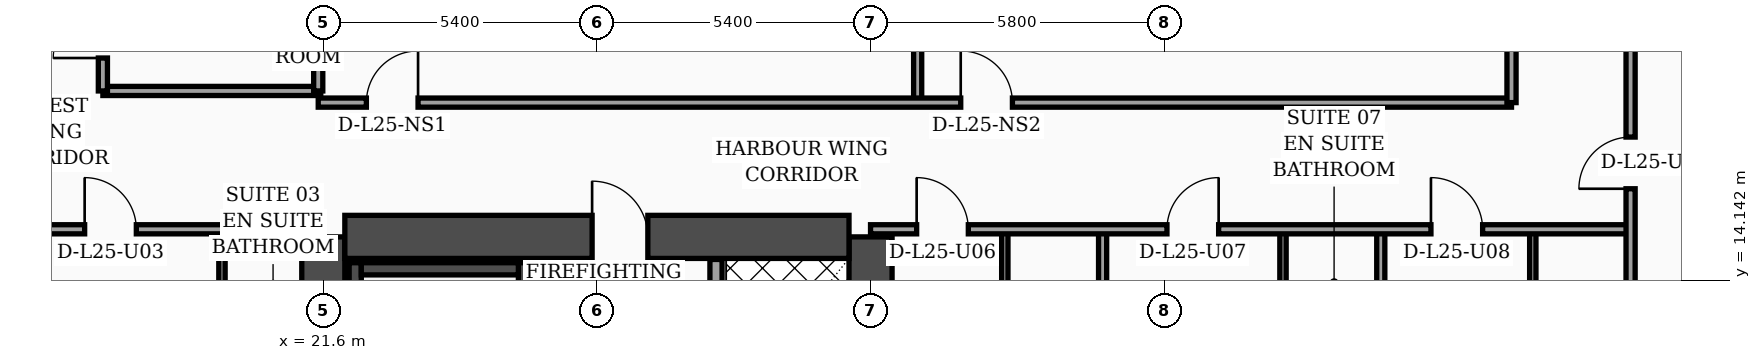
"""IFC4 building model, lengths in metres.
Left out: names, types, materials, properties, quantities, classifications, styles, units other than length and angle.
Written with IfcOpenShell. Run it as: python <this file> out.ifc"""

import sys

from ifc_helpers import new_model, si_unit, direction, frame, frame_2d, origin, place, context, subcontext, project, spatial, rectangle, extrude, element, fill, save


model = new_model("IFC4")
c1 = context("Model", 3, precision=1e-05, world=origin(), true_north=direction((0.0, 1.0)))
c2 = subcontext(c1, "Body", "Model", "MODEL_VIEW")
j1 = project(units=[si_unit("LENGTHUNIT", "METRE"), si_unit("PLANEANGLEUNIT", "RADIAN")], contexts=[c1])
p1 = place(None, origin())
s1 = spatial("IfcSite", under=j1, at=p1, CompositionType="ELEMENT")
p2 = place(p1, origin())
s2 = spatial("IfcBuilding", under=s1, at=p2, CompositionType="ELEMENT")
p3 = place(p2, frame((0.0, 0.0, 105.0)))
s3 = spatial("IfcBuildingStorey", under=s2, at=p3, CompositionType="ELEMENT", Elevation=105.0)
for number, where, z_axis, x_axis in (
    (1, (21.6, 4.6, 0.0), (0.0, 0.0, 1.0), (0.0, 1.0, 0.0)),
    (2, (32.4, 4.6, 0.0), (0.0, 0.0, 1.0), (0.0, 1.0, 0.0)),
):
    element("IfcWall", number, at=place(p3, frame(where, z_axis=z_axis, x_axis=x_axis)), inside=s3, PredefinedType="SHEAR", context=c2, shape_type="SweptSolid", body=[
        extrude(rectangle(XDim=10.4, YDim=0.85, at=frame_2d((5.2, 0.0))), origin(), (0.0, 0.0, 1.0), 3.56),
    ])
p4 = place(p3, frame((22.025, 15.0, 0.0), z_axis=(0.0, 0.0, 1.0), x_axis=(1.0, 0.0, 0.0)))
e3 = element("IfcWall", 3, at=p4, inside=s3, PredefinedType="SHEAR", context=c2, shape_type="SweptSolid", body=[
    extrude(rectangle(XDim=9.95, YDim=0.85, at=frame_2d((4.975, 0.0))), origin(), (0.0, 0.0, 1.0), 3.56),
])
p5 = place(p4, frame((4.88, 0.0, 0.0)))
e4 = element("IfcOpeningElement", 4, at=p5, cuts=e3, PredefinedType="OPENING", context=c2, shape_type="SweptSolid", body=[
    extrude(rectangle(XDim=1.1, YDim=2.2, at=frame_2d((0.55, 1.1))), frame((0.0, 0.435, 0.0), z_axis=(0.0, -1.0, 0.0), x_axis=(1.0, 0.0, 0.0)), (0.0, 0.0, 1.0), 0.87),
])
p6 = place(p3, frame((22.23, 5.025, 0.0), z_axis=(0.0, 0.0, 1.0), x_axis=(0.0, 1.0, 0.0)))
e5 = element("IfcWall", 5, at=p6, inside=s3, PredefinedType="SOLIDWALL", context=c2, shape_type="SweptSolid", body=[
    extrude(rectangle(XDim=9.465, YDim=0.24, at=frame_2d((4.732, 0.0))), origin(), (0.0, 0.0, 1.0), 3.56),
])
p7 = place(p3, frame((25.57, 5.025, 0.0), z_axis=(0.0, 0.0, 1.0), x_axis=(0.0, 1.0, 0.0)))
e6 = element("IfcWall", 6, at=p7, inside=s3, PredefinedType="SOLIDWALL", context=c2, shape_type="SweptSolid", body=[
    extrude(rectangle(XDim=9.465, YDim=0.24, at=frame_2d((4.732, 0.0))), origin(), (0.0, 0.0, 1.0), 3.56),
])
p8 = place(p7, frame((0.35, 0.0, 0.0)))
e7 = element("IfcOpeningElement", 7, at=p8, cuts=e6, PredefinedType="OPENING", context=c2, shape_type="SweptSolid", body=[
    extrude(rectangle(XDim=1.15, YDim=2.2, at=frame_2d((0.575, 1.1))), frame((0.0, 0.13, 0.0), z_axis=(0.0, -1.0, 0.0), x_axis=(1.0, 0.0, 0.0)), (0.0, 0.0, 1.0), 0.26),
])
p9 = place(p3, frame((22.35, 14.37, 0.0), z_axis=(0.0, 0.0, 1.0), x_axis=(1.0, 0.0, 0.0)))
e8 = element("IfcWall", 8, at=p9, inside=s3, PredefinedType="SOLIDWALL", context=c2, shape_type="SweptSolid", body=[
    extrude(rectangle(XDim=3.1, YDim=0.24, at=frame_2d((1.55, 0.0))), origin(), (0.0, 0.0, 1.0), 3.56),
])
p10 = place(p3, frame((29.35, 5.045, 0.0), z_axis=(0.0, 0.0, 1.0), x_axis=(0.0, 1.0, 0.0)))
e9 = element("IfcWall", 9, at=p10, inside=s3, PredefinedType="SOLIDWALL", context=c2, shape_type="SweptSolid", body=[
    extrude(rectangle(XDim=9.51, YDim=0.24, at=frame_2d((4.755, 0.0))), origin(), (0.0, 0.0, 1.0), 3.56),
])
p11 = place(p10, frame((0.55, 0.0, 0.0)))
e10 = element("IfcOpeningElement", 10, at=p11, cuts=e9, PredefinedType="OPENING", context=c2, shape_type="SweptSolid", body=[
    extrude(rectangle(XDim=1.3, YDim=2.35, at=frame_2d((0.65, 1.175))), frame((0.0, 0.13, 0.0), z_axis=(0.0, -1.0, 0.0), x_axis=(1.0, 0.0, 0.0)), (0.0, 0.0, 1.0), 0.26),
])
p12 = place(p3, frame((19.6, 2.44, 0.0), z_axis=(0.0, 0.0, 1.0), x_axis=(0.0, 1.0, 0.0)))
e11 = element("IfcWall", 11, at=p12, inside=s3, PredefinedType="PARTITIONING", context=c2, shape_type="SweptSolid", body=[
    extrude(rectangle(XDim=12.71, YDim=0.125, at=frame_2d((6.355, 0.0))), origin(), (0.0, 0.0, 1.0), 2.49),
])
p13 = place(p12, frame((4.34, 0.0, 0.0)))
e12 = element("IfcOpeningElement", 12, at=p13, cuts=e11, PredefinedType="OPENING", context=c2, shape_type="SweptSolid", body=[
    extrude(rectangle(XDim=0.96, YDim=2.2, at=frame_2d((0.48, 1.1))), frame((0.0, 0.073, 0.0), z_axis=(0.0, -1.0, 0.0), x_axis=(1.0, 0.0, 0.0)), (0.0, 0.0, 1.0), 0.145),
])
p14 = place(p12, frame((10.18, 0.0, 0.0)))
e13 = element("IfcOpeningElement", 13, at=p14, cuts=e11, PredefinedType="OPENING", context=c2, shape_type="SweptSolid", body=[
    extrude(rectangle(XDim=0.9, YDim=2.15, at=frame_2d((0.45, 1.075))), frame((0.0, 0.073, 0.0), z_axis=(0.0, -1.0, 0.0), x_axis=(1.0, 0.0, 0.0)), (0.0, 0.0, 1.0), 0.145),
])
p15 = place(p3, frame((15.15, 15.15, 0.0), z_axis=(0.0, 0.0, 1.0), x_axis=(1.0, 0.0, 0.0)))
e14 = element("IfcWall", 14, at=p15, inside=s3, PredefinedType="PARTITIONING", context=c2, shape_type="SweptSolid", body=[
    extrude(rectangle(XDim=6.45, YDim=0.18, at=frame_2d((3.225, 0.0))), origin(), (0.0, 0.0, 1.0), 2.49),
])
p16 = place(p15, frame((1.74, 0.0, 0.0)))
e15 = element("IfcOpeningElement", 15, at=p16, cuts=e14, PredefinedType="OPENING", context=c2, shape_type="SweptSolid", body=[
    extrude(rectangle(XDim=1.02, YDim=2.2, at=frame_2d((0.51, 1.1))), frame((0.0, 0.1, 0.0), z_axis=(0.0, -1.0, 0.0), x_axis=(1.0, 0.0, 0.0)), (0.0, 0.0, 1.0), 0.2),
])
p17 = place(p3, frame((17.25, 17.88, 0.0), z_axis=(0.0, 0.0, 1.0), x_axis=(1.0, 0.0, 0.0)))
e16 = element("IfcWall", 16, at=p17, inside=s3, PredefinedType="PARTITIONING", context=c2, shape_type="SweptSolid", body=[
    extrude(rectangle(XDim=4.3, YDim=0.18, at=frame_2d((2.15, 0.0))), origin(), (0.0, 0.0, 1.0), 3.09),
])
p18 = place(p3, frame((21.5, 17.88, 0.0), z_axis=(0.0, 0.0, 1.0), x_axis=(0.0, 1.0, 0.0)))
e17 = element("IfcWall", 17, at=p18, inside=s3, PredefinedType="PARTITIONING", context=c2, shape_type="SweptSolid", body=[
    extrude(rectangle(XDim=6.44, YDim=0.18, at=frame_2d((3.22, 0.0))), origin(), (0.0, 0.0, 1.0), 3.09),
])
p19 = place(p3, frame((17.25, 17.88, 0.0), z_axis=(0.0, 0.0, 1.0), x_axis=(0.0, 1.0, 0.0)))
e18 = element("IfcWall", 18, at=p19, inside=s3, PredefinedType="PARTITIONING", context=c2, shape_type="SweptSolid", body=[
    extrude(rectangle(XDim=6.44, YDim=0.18, at=frame_2d((3.22, 0.0))), origin(), (0.0, 0.0, 1.0), 3.09),
])
p20 = place(p19, frame((0.65, 0.0, 0.0)))
e19 = element("IfcOpeningElement", 19, at=p20, cuts=e18, PredefinedType="OPENING", context=c2, shape_type="SweptSolid", body=[
    extrude(rectangle(XDim=0.98, YDim=2.15, at=frame_2d((0.49, 1.075))), frame((0.0, 0.1, 0.0), z_axis=(0.0, -1.0, 0.0), x_axis=(1.0, 0.0, 0.0)), (0.0, 0.0, 1.0), 0.2),
])
p21 = place(p19, frame((3.27, 0.0, 0.0)))
e20 = element("IfcOpeningElement", 20, at=p21, cuts=e18, PredefinedType="OPENING", context=c2, shape_type="SweptSolid", body=[
    extrude(rectangle(XDim=0.96, YDim=2.2, at=frame_2d((0.48, 1.1))), frame((0.0, 0.1, 0.0), z_axis=(0.0, -1.0, 0.0), x_axis=(1.0, 0.0, 0.0)), (0.0, 0.0, 1.0), 0.2),
])
p22 = place(p3, frame((35.05, 2.44, 0.0), z_axis=(0.0, 0.0, 1.0), x_axis=(0.0, 1.0, 0.0)))
e21 = element("IfcWall", 21, at=p22, inside=s3, PredefinedType="PARTITIONING", context=c2, shape_type="SweptSolid", body=[
    extrude(rectangle(XDim=12.71, YDim=0.125, at=frame_2d((6.355, 0.0))), origin(), (0.0, 0.0, 1.0), 2.84),
])
p23 = place(p22, frame((4.35, 0.0, 0.0)))
e22 = element("IfcOpeningElement", 22, at=p23, cuts=e21, PredefinedType="OPENING", context=c2, shape_type="SweptSolid", body=[
    extrude(rectangle(XDim=0.96, YDim=2.2, at=frame_2d((0.48, 1.1))), frame((0.0, 0.073, 0.0), z_axis=(0.0, -1.0, 0.0), x_axis=(1.0, 0.0, 0.0)), (0.0, 0.0, 1.0), 0.145),
])
p24 = place(p22, frame((10.21, 0.0, 0.0)))
e23 = element("IfcOpeningElement", 23, at=p24, cuts=e21, PredefinedType="OPENING", context=c2, shape_type="SweptSolid", body=[
    extrude(rectangle(XDim=0.9, YDim=2.15, at=frame_2d((0.45, 1.075))), frame((0.0, 0.073, 0.0), z_axis=(0.0, -1.0, 0.0), x_axis=(1.0, 0.0, 0.0)), (0.0, 0.0, 1.0), 0.145),
])
p25 = place(p3, frame((40.54, 2.44, 0.0), z_axis=(0.0, 0.0, 1.0), x_axis=(0.0, 1.0, 0.0)))
e24 = element("IfcWall", 24, at=p25, inside=s3, PredefinedType="PARTITIONING", context=c2, shape_type="SweptSolid", body=[
    extrude(rectangle(XDim=12.71, YDim=0.125, at=frame_2d((6.355, 0.0))), origin(), (0.0, 0.0, 1.0), 2.84),
])
p26 = place(p25, frame((4.35, 0.0, 0.0)))
e25 = element("IfcOpeningElement", 25, at=p26, cuts=e24, PredefinedType="OPENING", context=c2, shape_type="SweptSolid", body=[
    extrude(rectangle(XDim=0.96, YDim=2.2, at=frame_2d((0.48, 1.1))), frame((0.0, 0.073, 0.0), z_axis=(0.0, -1.0, 0.0), x_axis=(1.0, 0.0, 0.0)), (0.0, 0.0, 1.0), 0.145),
])
p27 = place(p25, frame((10.21, 0.0, 0.0)))
e26 = element("IfcOpeningElement", 26, at=p27, cuts=e24, PredefinedType="OPENING", context=c2, shape_type="SweptSolid", body=[
    extrude(rectangle(XDim=0.9, YDim=2.15, at=frame_2d((0.45, 1.075))), frame((0.0, 0.073, 0.0), z_axis=(0.0, -1.0, 0.0), x_axis=(1.0, 0.0, 0.0)), (0.0, 0.0, 1.0), 0.145),
])
p28 = place(p3, frame((36.98, 2.44, 0.0), z_axis=(0.0, 0.0, 1.0), x_axis=(0.0, 1.0, 0.0)))
e27 = element("IfcWall", 27, at=p28, inside=s3, PredefinedType="PARTITIONING", context=c2, shape_type="SweptSolid", body=[
    extrude(rectangle(XDim=12.71, YDim=0.16, at=frame_2d((6.355, 0.0))), origin(), (0.0, 0.0, 1.0), 2.84),
])
p29 = place(p3, frame((45.47, 2.44, 0.0), z_axis=(0.0, 0.0, 1.0), x_axis=(0.0, 1.0, 0.0)))
e28 = element("IfcWall", 28, at=p29, inside=s3, PredefinedType="PARTITIONING", context=c2, shape_type="SweptSolid", body=[
    extrude(rectangle(XDim=12.71, YDim=0.125, at=frame_2d((6.355, 0.0))), origin(), (0.0, 0.0, 1.0), 3.04),
])
p30 = place(p29, frame((4.35, 0.0, 0.0)))
e29 = element("IfcOpeningElement", 29, at=p30, cuts=e28, PredefinedType="OPENING", context=c2, shape_type="SweptSolid", body=[
    extrude(rectangle(XDim=0.96, YDim=2.2, at=frame_2d((0.48, 1.1))), frame((0.0, 0.073, 0.0), z_axis=(0.0, -1.0, 0.0), x_axis=(1.0, 0.0, 0.0)), (0.0, 0.0, 1.0), 0.145),
])
p31 = place(p29, frame((10.21, 0.0, 0.0)))
e30 = element("IfcOpeningElement", 30, at=p31, cuts=e28, PredefinedType="OPENING", context=c2, shape_type="SweptSolid", body=[
    extrude(rectangle(XDim=0.9, YDim=2.15, at=frame_2d((0.45, 1.075))), frame((0.0, 0.073, 0.0), z_axis=(0.0, -1.0, 0.0), x_axis=(1.0, 0.0, 0.0)), (0.0, 0.0, 1.0), 0.145),
])
p32 = place(p3, frame((42.47, 2.44, 0.0), z_axis=(0.0, 0.0, 1.0), x_axis=(0.0, 1.0, 0.0)))
e31 = element("IfcWall", 31, at=p32, inside=s3, PredefinedType="PARTITIONING", context=c2, shape_type="SweptSolid", body=[
    extrude(rectangle(XDim=12.71, YDim=0.16, at=frame_2d((6.355, 0.0))), origin(), (0.0, 0.0, 1.0), 3.04),
])
p33 = place(p3, frame((32.4, 15.15, 0.0), z_axis=(0.0, 0.0, 1.0), x_axis=(1.0, 0.0, 0.0)))
e32 = element("IfcWall", 32, at=p33, inside=s3, PredefinedType="PARTITIONING", context=c2, shape_type="SweptSolid", body=[
    extrude(rectangle(XDim=15.0, YDim=0.18, at=frame_2d((7.5, 0.0))), origin(), (0.0, 0.0, 1.0), 2.84),
])
p34 = place(p33, frame((0.91, 0.0, 0.0)))
e33 = element("IfcOpeningElement", 33, at=p34, cuts=e32, PredefinedType="OPENING", context=c2, shape_type="SweptSolid", body=[
    extrude(rectangle(XDim=1.02, YDim=2.2, at=frame_2d((0.51, 1.1))), frame((0.0, 0.1, 0.0), z_axis=(0.0, -1.0, 0.0), x_axis=(1.0, 0.0, 0.0)), (0.0, 0.0, 1.0), 0.2),
])
p35 = place(p33, frame((5.85, 0.0, 0.0)))
e34 = element("IfcOpeningElement", 34, at=p35, cuts=e32, PredefinedType="OPENING", context=c2, shape_type="SweptSolid", body=[
    extrude(rectangle(XDim=1.02, YDim=2.2, at=frame_2d((0.51, 1.1))), frame((0.0, 0.1, 0.0), z_axis=(0.0, -1.0, 0.0), x_axis=(1.0, 0.0, 0.0)), (0.0, 0.0, 1.0), 0.2),
])
p36 = place(p33, frame((11.06, 0.0, 0.0)))
e35 = element("IfcOpeningElement", 35, at=p36, cuts=e32, PredefinedType="OPENING", context=c2, shape_type="SweptSolid", body=[
    extrude(rectangle(XDim=1.02, YDim=2.2, at=frame_2d((0.51, 1.1))), frame((0.0, 0.1, 0.0), z_axis=(0.0, -1.0, 0.0), x_axis=(1.0, 0.0, 0.0)), (0.0, 0.0, 1.0), 0.2),
])
p37 = place(p3, frame((33.33, 17.65, 0.0), z_axis=(0.0, 0.0, 1.0), x_axis=(0.0, 1.0, 0.0)))
e36 = element("IfcWall", 36, at=p37, inside=s3, PredefinedType="PARTITIONING", context=c2, shape_type="SweptSolid", body=[
    extrude(rectangle(XDim=13.37, YDim=0.16, at=frame_2d((6.685, 0.0))), origin(), (0.0, 0.0, 1.0), 2.84),
])
p38 = place(p3, frame((21.5, 17.65, 0.0), z_axis=(0.0, 0.0, 1.0), x_axis=(1.0, 0.0, 0.0)))
e37 = element("IfcWall", 37, at=p38, inside=s3, PredefinedType="PARTITIONING", context=c2, shape_type="SweptSolid", body=[
    extrude(rectangle(XDim=23.55, YDim=0.18, at=frame_2d((11.775, 0.0))), origin(), (0.0, 0.0, 1.0), 2.84),
])
p39 = place(p38, frame((0.95, 0.0, 0.0)))
e38 = element("IfcOpeningElement", 38, at=p39, cuts=e37, PredefinedType="OPENING", context=c2, shape_type="SweptSolid", body=[
    extrude(rectangle(XDim=1.02, YDim=2.2, at=frame_2d((0.51, 1.1))), frame((0.0, 0.1, 0.0), z_axis=(0.0, -1.0, 0.0), x_axis=(1.0, 0.0, 0.0)), (0.0, 0.0, 1.0), 0.2),
])
p40 = place(p38, frame((12.68, 0.0, 0.0)))
e39 = element("IfcOpeningElement", 39, at=p40, cuts=e37, PredefinedType="OPENING", context=c2, shape_type="SweptSolid", body=[
    extrude(rectangle(XDim=1.02, YDim=2.2, at=frame_2d((0.51, 1.1))), frame((0.0, 0.1, 0.0), z_axis=(0.0, -1.0, 0.0), x_axis=(1.0, 0.0, 0.0)), (0.0, 0.0, 1.0), 0.2),
])
p41 = place(p3, frame((45.05, 17.65, 0.0), z_axis=(0.0, 0.0, 1.0), x_axis=(0.0, 1.0, 0.0)))
e40 = element("IfcWall", 40, at=p41, inside=s3, PredefinedType="PARTITIONING", context=c2, shape_type="SweptSolid", body=[
    extrude(rectangle(XDim=19.9, YDim=0.18, at=frame_2d((9.95, 0.0))), origin(), (0.0, 0.0, 1.0), 2.84),
])
p42 = place(p3, frame((47.4, 2.44, 0.0), z_axis=(0.0, 0.0, 1.0), x_axis=(0.0, 1.0, 0.0)))
e41 = element("IfcWall", 41, at=p42, inside=s3, PredefinedType="PARTITIONING", context=c2, shape_type="SweptSolid", body=[
    extrude(rectangle(XDim=27.84, YDim=0.18, at=frame_2d((13.92, 0.0))), origin(), (0.0, 0.0, 1.0), 2.84),
])
p43 = place(p42, frame((13.51, 0.0, 0.0)))
e42 = element("IfcOpeningElement", 42, at=p43, cuts=e41, PredefinedType="OPENING", context=c2, shape_type="SweptSolid", body=[
    extrude(rectangle(XDim=1.02, YDim=2.2, at=frame_2d((0.51, 1.1))), frame((0.0, 0.1, 0.0), z_axis=(0.0, -1.0, 0.0), x_axis=(1.0, 0.0, 0.0)), (0.0, 0.0, 1.0), 0.2),
])
p44 = place(p42, frame((21.52, 0.0, 0.0)))
e43 = element("IfcOpeningElement", 43, at=p44, cuts=e41, PredefinedType="OPENING", context=c2, shape_type="SweptSolid", body=[
    extrude(rectangle(XDim=1.02, YDim=2.2, at=frame_2d((0.51, 1.1))), frame((0.0, 0.1, 0.0), z_axis=(0.0, -1.0, 0.0), x_axis=(1.0, 0.0, 0.0)), (0.0, 0.0, 1.0), 0.2),
])
p45 = place(p16, origin())
e44 = element("IfcDoor", 44, at=p45, inside=s3, OperationType="SINGLE_SWING_LEFT", PredefinedType="DOOR", context=c2, shape_type="SweptSolid", body=[
    extrude(rectangle(XDim=1.02, YDim=2.2, at=frame_2d((0.51, 1.1))), frame((0.0, 0.025, 0.0), z_axis=(0.0, -1.0, 0.0), x_axis=(1.0, 0.0, 0.0)), (0.0, 0.0, 1.0), 0.05),
])
fill(e15, e44)
p46 = place(p20, origin())
e45 = element("IfcDoor", 45, at=p46, inside=s3, OperationType="SINGLE_SWING_LEFT", PredefinedType="DOOR", context=c2, shape_type="SweptSolid", body=[
    extrude(rectangle(XDim=0.98, YDim=2.15, at=frame_2d((0.49, 1.075))), frame((0.0, 0.025, 0.0), z_axis=(0.0, -1.0, 0.0), x_axis=(1.0, 0.0, 0.0)), (0.0, 0.0, 1.0), 0.05),
])
fill(e19, e45)
p47 = place(p34, origin())
e46 = element("IfcDoor", 46, at=p47, inside=s3, OperationType="SINGLE_SWING_LEFT", PredefinedType="DOOR", context=c2, shape_type="SweptSolid", body=[
    extrude(rectangle(XDim=1.02, YDim=2.2, at=frame_2d((0.51, 1.1))), frame((0.0, 0.025, 0.0), z_axis=(0.0, -1.0, 0.0), x_axis=(1.0, 0.0, 0.0)), (0.0, 0.0, 1.0), 0.05),
])
fill(e33, e46)
p48 = place(p35, origin())
e47 = element("IfcDoor", 47, at=p48, inside=s3, OperationType="SINGLE_SWING_RIGHT", PredefinedType="DOOR", context=c2, shape_type="SweptSolid", body=[
    extrude(rectangle(XDim=1.02, YDim=2.2, at=frame_2d((0.51, 1.1))), frame((0.0, 0.025, 0.0), z_axis=(0.0, -1.0, 0.0), x_axis=(1.0, 0.0, 0.0)), (0.0, 0.0, 1.0), 0.05),
])
fill(e34, e47)
p49 = place(p36, origin())
e48 = element("IfcDoor", 48, at=p49, inside=s3, OperationType="SINGLE_SWING_LEFT", PredefinedType="DOOR", context=c2, shape_type="SweptSolid", body=[
    extrude(rectangle(XDim=1.02, YDim=2.2, at=frame_2d((0.51, 1.1))), frame((0.0, 0.025, 0.0), z_axis=(0.0, -1.0, 0.0), x_axis=(1.0, 0.0, 0.0)), (0.0, 0.0, 1.0), 0.05),
])
fill(e35, e48)
p50 = place(p39, origin())
e49 = element("IfcDoor", 49, at=p50, inside=s3, OperationType="SINGLE_SWING_RIGHT", PredefinedType="DOOR", context=c2, shape_type="SweptSolid", body=[
    extrude(rectangle(XDim=1.02, YDim=2.2, at=frame_2d((0.51, 1.1))), frame((0.0, 0.025, 0.0), z_axis=(0.0, -1.0, 0.0), x_axis=(1.0, 0.0, 0.0)), (0.0, 0.0, 1.0), 0.05),
])
fill(e38, e49)
p51 = place(p40, origin())
e50 = element("IfcDoor", 50, at=p51, inside=s3, OperationType="SINGLE_SWING_LEFT", PredefinedType="DOOR", context=c2, shape_type="SweptSolid", body=[
    extrude(rectangle(XDim=1.02, YDim=2.2, at=frame_2d((0.51, 1.1))), frame((0.0, 0.025, 0.0), z_axis=(0.0, -1.0, 0.0), x_axis=(1.0, 0.0, 0.0)), (0.0, 0.0, 1.0), 0.05),
])
fill(e39, e50)
p52 = place(p43, origin())
e51 = element("IfcDoor", 51, at=p52, inside=s3, OperationType="SINGLE_SWING_LEFT", PredefinedType="DOOR", context=c2, shape_type="SweptSolid", body=[
    extrude(rectangle(XDim=1.02, YDim=2.2, at=frame_2d((0.51, 1.1))), frame((0.0, 0.025, 0.0), z_axis=(0.0, -1.0, 0.0), x_axis=(1.0, 0.0, 0.0)), (0.0, 0.0, 1.0), 0.05),
])
fill(e42, e51)
p53 = place(p5, origin())
e52 = element("IfcDoor", 52, at=p53, inside=s3, OperationType="SINGLE_SWING_LEFT", PredefinedType="DOOR", context=c2, shape_type="SweptSolid", body=[
    extrude(rectangle(XDim=1.1, YDim=2.2, at=frame_2d((0.55, 1.1))), frame((0.0, 0.025, 0.0), z_axis=(0.0, -1.0, 0.0), x_axis=(1.0, 0.0, 0.0)), (0.0, 0.0, 1.0), 0.05),
])
fill(e4, e52)
save(model, sys.argv[1])
